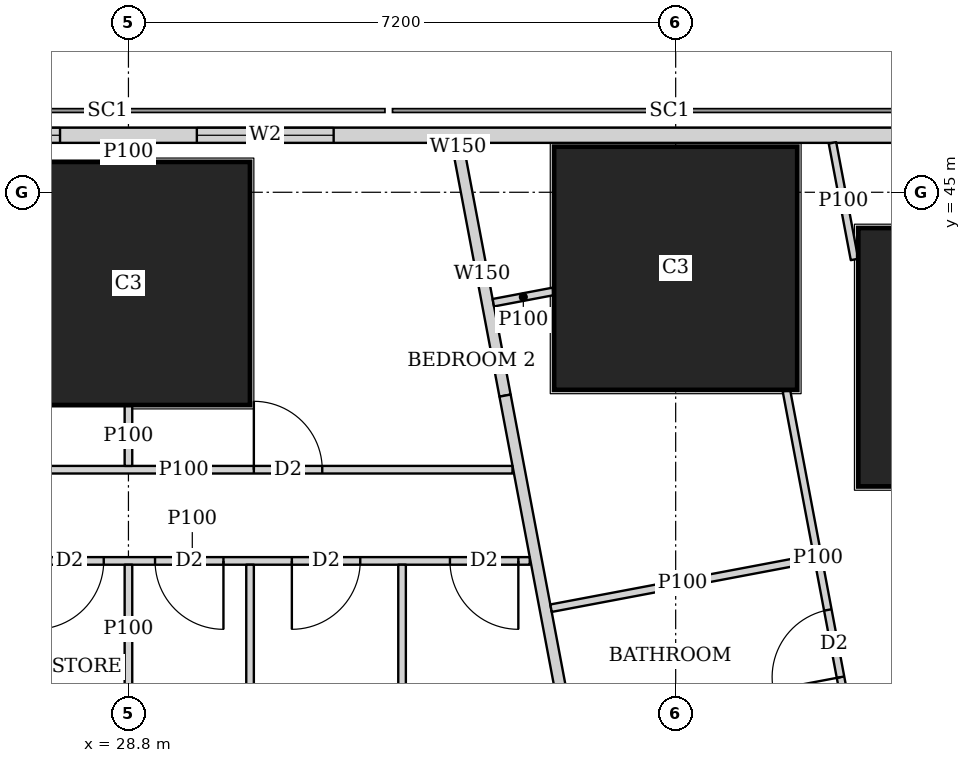
"""IFC4 building model, lengths in metres.
Left out: names, types, materials, properties, quantities, classifications, styles, units other than length and angle.
Written with IfcOpenShell. Run it as: python <this file> out.ifc"""

import sys

from ifc_helpers import new_model, si_unit, direction, frame, frame_2d, origin, origin_2d, place, context, subcontext, project, spatial, rectangle, extrude, element, fill, save


model = new_model("IFC4")
c1 = context("Model", 3, precision=1e-05, world=origin(), true_north=direction((0.0, 1.0)))
c2 = subcontext(c1, "Body", "Model", "MODEL_VIEW")
j1 = project(units=[si_unit("LENGTHUNIT", "METRE"), si_unit("PLANEANGLEUNIT", "RADIAN")], contexts=[c1])
p1 = place(None, origin())
s1 = spatial("IfcSite", under=j1, at=p1, CompositionType="ELEMENT")
p2 = place(p1, origin())
s2 = spatial("IfcBuilding", under=s1, at=p2, CompositionType="ELEMENT")
p3 = place(p2, frame((0.0, 0.0, 20.0)))
s3 = spatial("IfcBuildingStorey", under=s2, at=p3, CompositionType="ELEMENT", Elevation=20.0)
p4 = place(p3, frame((40.102, 42.83, 0.0), z_axis=(0.0, 0.0, 1.0), x_axis=(1.0, 0.0, 0.0)))
e1 = element("IfcColumn", 1, at=p4, inside=s3, PredefinedType="COLUMN", context=c2, shape_type="SweptSolid", body=[
    extrude(rectangle(XDim=3.4, YDim=3.4, at=origin_2d()), origin(), (0.0, 0.0, 1.0), 3.75),
])
p5 = place(p3, frame((28.8, 43.8, 0.0), z_axis=(0.0, 0.0, 1.0), x_axis=(1.0, 0.0, 0.0)))
e2 = element("IfcColumn", 2, at=p5, inside=s3, PredefinedType="COLUMN", context=c2, shape_type="SweptSolid", body=[
    extrude(rectangle(XDim=3.2, YDim=3.2, at=origin_2d()), origin(), (0.0, 0.0, 1.0), 3.75),
])
p6 = place(p3, frame((36.0, 44.0, -0.3), z_axis=(0.0, 0.0, 1.0), x_axis=(1.0, 0.0, 0.0)))
e3 = element("IfcColumn", 3, at=p6, inside=s3, PredefinedType="COLUMN", context=c2, shape_type="SweptSolid", body=[
    extrude(rectangle(XDim=3.2, YDim=3.2, at=origin_2d()), origin(), (0.0, 0.0, 1.0), 4.05),
])
p7 = place(p3, frame((40.106, 45.75, 0.0), z_axis=(0.0, 0.0, 1.0), x_axis=(-1.0, 0.0, 0.0)))
e4 = element("IfcWall", 4, at=p7, inside=s3, PredefinedType="SOLIDWALL", context=c2, shape_type="SweptSolid", body=[
    extrude(rectangle(XDim=37.943, YDim=0.2, at=frame_2d((18.971, 0.0))), origin(), (0.0, 0.0, 1.0), 3.5),
])
p8 = place(p7, frame((8.606, 0.0, 0.9)))
e5 = element("IfcOpeningElement", 5, at=p8, cuts=e4, PredefinedType="OPENING", context=c2, shape_type="SweptSolid", body=[
    extrude(rectangle(XDim=1.8, YDim=1.5, at=frame_2d((0.9, 0.75))), frame((0.0, 0.11, 0.0), z_axis=(0.0, -1.0, 0.0), x_axis=(1.0, 0.0, 0.0)), (0.0, 0.0, 1.0), 0.22),
])
p9 = place(p7, frame((12.206, 0.0, 0.9)))
e6 = element("IfcOpeningElement", 6, at=p9, cuts=e4, PredefinedType="OPENING", context=c2, shape_type="SweptSolid", body=[
    extrude(rectangle(XDim=1.8, YDim=1.5, at=frame_2d((0.9, 0.75))), frame((0.0, 0.11, 0.0), z_axis=(0.0, -1.0, 0.0), x_axis=(1.0, 0.0, 0.0)), (0.0, 0.0, 1.0), 0.22),
])
p10 = place(p7, frame((15.806, 0.0, 0.9)))
e7 = element("IfcOpeningElement", 7, at=p10, cuts=e4, PredefinedType="OPENING", context=c2, shape_type="SweptSolid", body=[
    extrude(rectangle(XDim=1.8, YDim=1.5, at=frame_2d((0.9, 0.75))), frame((0.0, 0.11, 0.0), z_axis=(0.0, -1.0, 0.0), x_axis=(1.0, 0.0, 0.0)), (0.0, 0.0, 1.0), 0.22),
])
p11 = place(p7, frame((19.406, 0.0, 0.9)))
e8 = element("IfcOpeningElement", 8, at=p11, cuts=e4, PredefinedType="OPENING", context=c2, shape_type="SweptSolid", body=[
    extrude(rectangle(XDim=1.8, YDim=1.5, at=frame_2d((0.9, 0.75))), frame((0.0, 0.11, 0.0), z_axis=(0.0, -1.0, 0.0), x_axis=(1.0, 0.0, 0.0)), (0.0, 0.0, 1.0), 0.22),
])
p12 = place(p7, frame((23.006, 0.0, 0.9)))
e9 = element("IfcOpeningElement", 9, at=p12, cuts=e4, PredefinedType="OPENING", context=c2, shape_type="SweptSolid", body=[
    extrude(rectangle(XDim=1.8, YDim=1.5, at=frame_2d((0.9, 0.75))), frame((0.0, 0.11, 0.0), z_axis=(0.0, -1.0, 0.0), x_axis=(1.0, 0.0, 0.0)), (0.0, 0.0, 1.0), 0.22),
])
p13 = place(p7, frame((26.606, 0.0, 0.9)))
e10 = element("IfcOpeningElement", 10, at=p13, cuts=e4, PredefinedType="OPENING", context=c2, shape_type="SweptSolid", body=[
    extrude(rectangle(XDim=1.8, YDim=1.5, at=frame_2d((0.9, 0.75))), frame((0.0, 0.11, 0.0), z_axis=(0.0, -1.0, 0.0), x_axis=(1.0, 0.0, 0.0)), (0.0, 0.0, 1.0), 0.22),
])
p14 = place(p3, frame((33.127, 45.65, 0.0), z_axis=(0.0, 0.0, 1.0), x_axis=(0.184660164975, -0.98280243359, 0.0)))
e11 = element("IfcWall", 11, at=p14, inside=s3, PredefinedType="SOLIDWALL", context=c2, shape_type="SweptSolid", body=[
    extrude(rectangle(XDim=0.119, YDim=0.15, at=frame_2d((0.06, 0.0))), origin(), (0.0, 0.0, 1.0), 3.5),
])
p15 = place(p3, frame((33.149, 45.533, 0.0), z_axis=(0.0, 0.0, 1.0), x_axis=(0.185606774758, -0.98262410166, 0.0)))
e12 = element("IfcWall", 12, at=p15, inside=s3, PredefinedType="SOLIDWALL", context=c2, shape_type="SweptSolid", body=[
    extrude(rectangle(XDim=3.265, YDim=0.15, at=frame_2d((1.632, 0.0))), origin(), (0.0, 0.0, 1.0), 2.05),
])
p16 = place(p3, frame((33.755, 42.325, 0.0), z_axis=(0.0, 0.0, 1.0), x_axis=(0.185611461091, -0.982623216453, 0.0)))
e13 = element("IfcWall", 13, at=p16, inside=s3, PredefinedType="SOLIDWALL", context=c2, shape_type="SweptSolid", body=[
    extrude(rectangle(XDim=40.241, YDim=0.15, at=frame_2d((20.121, 0.0))), origin(), (0.0, 0.0, 1.0), 2.5),
])
p17 = place(p16, frame((7.325, 0.0, 0.0)))
e14 = element("IfcOpeningElement", 14, at=p17, cuts=e13, PredefinedType="OPENING", context=c2, shape_type="SweptSolid", body=[
    extrude(rectangle(XDim=1.0, YDim=2.1, at=frame_2d((0.5, 1.05))), frame((0.0, 0.085, 0.0), z_axis=(0.0, -1.0, 0.0), x_axis=(1.0, 0.0, 0.0)), (0.0, 0.0, 1.0), 0.17),
])
p18 = place(p16, frame((11.902, 0.0, 0.0)))
e15 = element("IfcOpeningElement", 15, at=p18, cuts=e13, PredefinedType="OPENING", context=c2, shape_type="SweptSolid", body=[
    extrude(rectangle(XDim=1.0, YDim=2.1, at=frame_2d((0.5, 1.05))), frame((0.0, 0.085, 0.0), z_axis=(0.0, -1.0, 0.0), x_axis=(1.0, 0.0, 0.0)), (0.0, 0.0, 1.0), 0.17),
])
p19 = place(p16, frame((25.718, 0.0, 0.0)))
e16 = element("IfcOpeningElement", 16, at=p19, cuts=e13, PredefinedType="OPENING", context=c2, shape_type="SweptSolid", body=[
    extrude(rectangle(XDim=1.0, YDim=2.1, at=frame_2d((0.5, 1.05))), frame((0.0, 0.085, 0.0), z_axis=(0.0, -1.0, 0.0), x_axis=(1.0, 0.0, 0.0)), (0.0, 0.0, 1.0), 0.17),
])
p20 = place(p16, frame((31.788, 0.0, 0.0)))
e17 = element("IfcOpeningElement", 17, at=p20, cuts=e13, PredefinedType="OPENING", context=c2, shape_type="SweptSolid", body=[
    extrude(rectangle(XDim=1.0, YDim=2.1, at=frame_2d((0.5, 1.05))), frame((0.0, 0.085, 0.0), z_axis=(0.0, -1.0, 0.0), x_axis=(1.0, 0.0, 0.0)), (0.0, 0.0, 1.0), 0.17),
])
p21 = place(p3, frame((38.063, 45.65, 0.0), z_axis=(0.0, 0.0, 1.0), x_axis=(0.185789650565, -0.982589540827, 0.0)))
e18 = element("IfcWall", 18, at=p21, inside=s3, PredefinedType="PARTITIONING", context=c2, shape_type="SweptSolid", body=[
    extrude(rectangle(XDim=1.561, YDim=0.1, at=frame_2d((0.781, 0.0))), origin(), (0.0, 0.0, 1.0), 3.5),
])
p22 = place(p3, frame((37.457, 42.39, 0.0), z_axis=(0.0, 0.0, 1.0), x_axis=(0.185560627322, -0.982632817276, 0.0)))
e19 = element("IfcWall", 19, at=p22, inside=s3, PredefinedType="PARTITIONING", context=c2, shape_type="SweptSolid", body=[
    extrude(rectangle(XDim=4.484, YDim=0.1, at=frame_2d((2.242, 0.0))), origin(), (0.0, 0.0, 1.0), 3.5),
])
p23 = place(p22, frame((2.936, 0.0, 0.0)))
e20 = element("IfcOpeningElement", 20, at=p23, cuts=e19, PredefinedType="OPENING", context=c2, shape_type="SweptSolid", body=[
    extrude(rectangle(XDim=0.9, YDim=2.1, at=frame_2d((0.45, 1.05))), frame((0.0, 0.06, 0.0), z_axis=(0.0, -1.0, 0.0), x_axis=(1.0, 0.0, 0.0)), (0.0, 0.0, 1.0), 0.12),
])
p24 = place(p3, frame((34.39, 43.696, 0.0), z_axis=(0.0, 0.0, 1.0), x_axis=(-0.982640737979, -0.185518678479, 0.0)))
e21 = element("IfcWall", 21, at=p24, inside=s3, PredefinedType="PARTITIONING", context=c2, shape_type="SweptSolid", body=[
    extrude(rectangle(XDim=0.803, YDim=0.1, at=frame_2d((0.401, 0.0))), origin(), (0.0, 0.0, 1.0), 2.05),
])
p25 = place(p3, frame((37.823, 40.182, 0.0), z_axis=(0.0, 0.0, 1.0), x_axis=(-0.98263926043, -0.185526504472, 0.0)))
e22 = element("IfcWall", 22, at=p25, inside=s3, PredefinedType="PARTITIONING", context=c2, shape_type="SweptSolid", body=[
    extrude(rectangle(XDim=3.524, YDim=0.1, at=frame_2d((1.762, 0.0))), origin(), (0.0, 0.0, 1.0), 3.5),
])
p26 = place(p3, frame((25.2, 41.35, 0.0), z_axis=(0.0, 0.0, 1.0), x_axis=(1.0, 0.0, 0.0)))
e23 = element("IfcWall", 23, at=p26, inside=s3, PredefinedType="PARTITIONING", context=c2, shape_type="SweptSolid", body=[
    extrude(rectangle(XDim=8.653, YDim=0.1, at=frame_2d((4.327, 0.0))), origin(), (0.0, 0.0, 1.0), 3.5),
])
p27 = place(p26, frame((0.2, 0.0, 0.0)))
e24 = element("IfcOpeningElement", 24, at=p27, cuts=e23, PredefinedType="OPENING", context=c2, shape_type="SweptSolid", body=[
    extrude(rectangle(XDim=0.9, YDim=2.1, at=frame_2d((0.45, 1.05))), frame((0.0, 0.06, 0.0), z_axis=(0.0, -1.0, 0.0), x_axis=(1.0, 0.0, 0.0)), (0.0, 0.0, 1.0), 0.12),
])
p28 = place(p26, frame((5.25, 0.0, 0.0)))
e25 = element("IfcOpeningElement", 25, at=p28, cuts=e23, PredefinedType="OPENING", context=c2, shape_type="SweptSolid", body=[
    extrude(rectangle(XDim=0.9, YDim=2.1, at=frame_2d((0.45, 1.05))), frame((0.0, 0.06, 0.0), z_axis=(0.0, -1.0, 0.0), x_axis=(1.0, 0.0, 0.0)), (0.0, 0.0, 1.0), 0.12),
])
p29 = place(p3, frame((25.2, 40.15, 0.0), z_axis=(0.0, 0.0, 1.0), x_axis=(1.0, 0.0, 0.0)))
e26 = element("IfcWall", 26, at=p29, inside=s3, PredefinedType="PARTITIONING", context=c2, shape_type="SweptSolid", body=[
    extrude(rectangle(XDim=8.88, YDim=0.1, at=frame_2d((4.44, 0.0))), origin(), (0.0, 0.0, 1.0), 3.5),
])
p30 = place(p29, frame((0.575, 0.0, 0.0)))
e27 = element("IfcOpeningElement", 27, at=p30, cuts=e26, PredefinedType="OPENING", context=c2, shape_type="SweptSolid", body=[
    extrude(rectangle(XDim=0.9, YDim=2.1, at=frame_2d((0.45, 1.05))), frame((0.0, 0.06, 0.0), z_axis=(0.0, -1.0, 0.0), x_axis=(1.0, 0.0, 0.0)), (0.0, 0.0, 1.0), 0.12),
])
p31 = place(p29, frame((3.95, 0.0, 0.0)))
e28 = element("IfcOpeningElement", 28, at=p31, cuts=e26, PredefinedType="OPENING", context=c2, shape_type="SweptSolid", body=[
    extrude(rectangle(XDim=0.9, YDim=2.1, at=frame_2d((0.45, 1.05))), frame((0.0, 0.06, 0.0), z_axis=(0.0, -1.0, 0.0), x_axis=(1.0, 0.0, 0.0)), (0.0, 0.0, 1.0), 0.12),
])
p32 = place(p29, frame((7.83, 0.0, 0.0)))
e29 = element("IfcOpeningElement", 29, at=p32, cuts=e26, PredefinedType="OPENING", context=c2, shape_type="SweptSolid", body=[
    extrude(rectangle(XDim=0.9, YDim=2.1, at=frame_2d((0.45, 1.05))), frame((0.0, 0.06, 0.0), z_axis=(0.0, -1.0, 0.0), x_axis=(1.0, 0.0, 0.0)), (0.0, 0.0, 1.0), 0.12),
])
p33 = place(p29, frame((2.375, 0.0, 0.0)))
e30 = element("IfcOpeningElement", 30, at=p33, cuts=e26, PredefinedType="OPENING", context=c2, shape_type="SweptSolid", body=[
    extrude(rectangle(XDim=0.9, YDim=2.1, at=frame_2d((0.45, 1.05))), frame((0.0, 0.06, 0.0), z_axis=(0.0, -1.0, 0.0), x_axis=(1.0, 0.0, 0.0)), (0.0, 0.0, 1.0), 0.12),
])
p34 = place(p29, frame((5.75, 0.0, 0.0)))
e31 = element("IfcOpeningElement", 31, at=p34, cuts=e26, PredefinedType="OPENING", context=c2, shape_type="SweptSolid", body=[
    extrude(rectangle(XDim=0.9, YDim=2.1, at=frame_2d((0.45, 1.05))), frame((0.0, 0.06, 0.0), z_axis=(0.0, -1.0, 0.0), x_axis=(1.0, 0.0, 0.0)), (0.0, 0.0, 1.0), 0.12),
])
p35 = place(p3, frame((28.8, 41.4, 0.0), z_axis=(0.0, 0.0, 1.0), x_axis=(0.0, 1.0, 0.0)))
e32 = element("IfcWall", 32, at=p35, inside=s3, PredefinedType="PARTITIONING", context=c2, shape_type="SweptSolid", body=[
    extrude(rectangle(XDim=0.799, YDim=0.1, at=frame_2d((0.399, 0.0))), origin(), (0.0, 0.0, 1.0), 3.5),
])
p36 = place(p3, frame((28.8, 45.401, 0.0), z_axis=(0.0, 0.0, 1.0), x_axis=(0.0, 1.0, 0.0)))
e33 = element("IfcWall", 33, at=p36, inside=s3, PredefinedType="PARTITIONING", context=c2, shape_type="SweptSolid", body=[
    extrude(rectangle(XDim=0.249, YDim=0.1, at=frame_2d((0.125, 0.0))), origin(), (0.0, 0.0, 1.0), 3.5),
])
p37 = place(p3, frame((28.8, 38.401, 0.0), z_axis=(0.0, 0.0, 1.0), x_axis=(0.0, 1.0, 0.0)))
e34 = element("IfcWall", 34, at=p37, inside=s3, PredefinedType="PARTITIONING", context=c2, shape_type="SweptSolid", body=[
    extrude(rectangle(XDim=1.699, YDim=0.1, at=frame_2d((0.85, 0.0))), origin(), (0.0, 0.0, 1.0), 3.5),
])
for number, where, z_axis, x_axis in (
    (35, (32.4, 36.575, 0.0), (0.0, 0.0, 1.0), (0.0, 1.0, 0.0)),
    (36, (30.4, 36.575, 0.0), (0.0, 0.0, 1.0), (0.0, 1.0, 0.0)),
):
    element("IfcWall", number, at=place(p3, frame(where, z_axis=z_axis, x_axis=x_axis)), inside=s3, PredefinedType="PARTITIONING", context=c2, shape_type="SweptSolid", body=[
        extrude(rectangle(XDim=3.525, YDim=0.1, at=frame_2d((1.763, 0.0))), origin(), (0.0, 0.0, 1.0), 3.5),
    ])
p38 = place(p8, origin())
e37 = element("IfcWindow", 37, at=p38, inside=s3, PartitioningType="SINGLE_PANEL", PredefinedType="WINDOW", context=c2, shape_type="SweptSolid", body=[
    extrude(rectangle(XDim=1.8, YDim=1.5, at=frame_2d((0.9, 0.75))), frame((0.0, 0.03, 0.0), z_axis=(0.0, -1.0, 0.0), x_axis=(1.0, 0.0, 0.0)), (0.0, 0.0, 1.0), 0.06),
])
fill(e5, e37)
p39 = place(p9, origin())
e38 = element("IfcWindow", 38, at=p39, inside=s3, PartitioningType="SINGLE_PANEL", PredefinedType="WINDOW", context=c2, shape_type="SweptSolid", body=[
    extrude(rectangle(XDim=1.8, YDim=1.5, at=frame_2d((0.9, 0.75))), frame((0.0, 0.03, 0.0), z_axis=(0.0, -1.0, 0.0), x_axis=(1.0, 0.0, 0.0)), (0.0, 0.0, 1.0), 0.06),
])
fill(e6, e38)
p40 = place(p23, origin())
e39 = element("IfcDoor", 39, at=p40, inside=s3, OperationType="SINGLE_SWING_LEFT", PredefinedType="DOOR", context=c2, shape_type="SweptSolid", body=[
    extrude(rectangle(XDim=0.9, YDim=2.1, at=frame_2d((0.45, 1.05))), frame((0.0, 0.025, 0.0), z_axis=(0.0, -1.0, 0.0), x_axis=(1.0, 0.0, 0.0)), (0.0, 0.0, 1.0), 0.05),
])
fill(e20, e39)
p41 = place(p28, origin())
e40 = element("IfcDoor", 40, at=p41, inside=s3, OperationType="SINGLE_SWING_LEFT", PredefinedType="DOOR", context=c2, shape_type="SweptSolid", body=[
    extrude(rectangle(XDim=0.9, YDim=2.1, at=frame_2d((0.45, 1.05))), frame((0.0, 0.025, 0.0), z_axis=(0.0, -1.0, 0.0), x_axis=(1.0, 0.0, 0.0)), (0.0, 0.0, 1.0), 0.05),
])
fill(e25, e40)
p42 = place(p31, origin())
e41 = element("IfcDoor", 41, at=p42, inside=s3, OperationType="SINGLE_SWING_LEFT", PredefinedType="DOOR", context=c2, shape_type="SweptSolid", body=[
    extrude(rectangle(XDim=0.9, YDim=2.1, at=frame_2d((0.45, 1.05))), frame((0.0, 0.025, 0.0), z_axis=(0.0, -1.0, 0.0), x_axis=(1.0, 0.0, 0.0)), (0.0, 0.0, 1.0), 0.05),
])
fill(e28, e41)
p43 = place(p32, origin())
e42 = element("IfcDoor", 42, at=p43, inside=s3, OperationType="SINGLE_SWING_LEFT", PredefinedType="DOOR", context=c2, shape_type="SweptSolid", body=[
    extrude(rectangle(XDim=0.9, YDim=2.1, at=frame_2d((0.45, 1.05))), frame((0.0, 0.025, 0.0), z_axis=(0.0, -1.0, 0.0), x_axis=(1.0, 0.0, 0.0)), (0.0, 0.0, 1.0), 0.05),
])
fill(e29, e42)
p44 = place(p33, origin())
e43 = element("IfcDoor", 43, at=p44, inside=s3, OperationType="SINGLE_SWING_RIGHT", PredefinedType="DOOR", context=c2, shape_type="SweptSolid", body=[
    extrude(rectangle(XDim=0.9, YDim=2.1, at=frame_2d((0.45, 1.05))), frame((0.0, 0.025, 0.0), z_axis=(0.0, -1.0, 0.0), x_axis=(1.0, 0.0, 0.0)), (0.0, 0.0, 1.0), 0.05),
])
fill(e30, e43)
p45 = place(p34, origin())
e44 = element("IfcDoor", 44, at=p45, inside=s3, OperationType="SINGLE_SWING_RIGHT", PredefinedType="DOOR", context=c2, shape_type="SweptSolid", body=[
    extrude(rectangle(XDim=0.9, YDim=2.1, at=frame_2d((0.45, 1.05))), frame((0.0, 0.025, 0.0), z_axis=(0.0, -1.0, 0.0), x_axis=(1.0, 0.0, 0.0)), (0.0, 0.0, 1.0), 0.05),
])
fill(e31, e44)
save(model, sys.argv[1])
